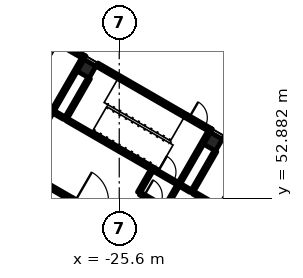
"""IFC4 building model, lengths in metres.
Left out: names, types, materials, properties, quantities, classifications, styles, units other than length and angle.
Written with IfcOpenShell. Run it as: python <this file> out.ifc"""

import sys

from ifc_helpers import new_model, si_unit, direction, frame, frame_2d, origin, origin_2d, place, context, subcontext, project, spatial, rectangle, extrude, element, fill, save


model = new_model("IFC4")
c1 = context("Model", 3, precision=1e-05, world=origin(), true_north=direction((0.0, 1.0)))
c2 = subcontext(c1, "Body", "Model", "MODEL_VIEW")
j1 = project(units=[si_unit("LENGTHUNIT", "METRE"), si_unit("PLANEANGLEUNIT", "RADIAN")], contexts=[c1])
p1 = place(None, origin())
s1 = spatial("IfcSite", under=j1, at=p1, CompositionType="ELEMENT")
p2 = place(p1, origin())
s2 = spatial("IfcBuilding", under=s1, at=p2, CompositionType="ELEMENT")
p3 = place(p2, origin())
s3 = spatial("IfcBuildingStorey", under=s2, at=p3, CompositionType="ELEMENT", Elevation=0.0)
for number, where, z_axis, x_axis in (
    (1, (-19.432, 56.599, -0.3), (0.0, 0.0, 1.0), (-0.5, -0.866, 0.0)),
    (2, (-27.746, 61.399, -0.3), (0.0, 0.0, 1.0), (-0.5, -0.866, 0.0)),
):
    element("IfcColumn", number, at=place(p3, frame(where, z_axis=z_axis, x_axis=x_axis)), inside=s3, PredefinedType="COLUMN", context=c2, shape_type="SweptSolid", body=[
        extrude(rectangle(XDim=0.9, YDim=0.9, at=origin_2d()), origin(), (0.0, 0.0, 1.0), 6.3),
    ])
p4 = place(p3, frame((-18.755, 56.872, 0.0), z_axis=(0.0, 0.0, 1.0), x_axis=(0.866026575979, -0.499997969693, 0.0)))
e3 = element("IfcWall", 3, at=p4, inside=s3, PredefinedType="SOLIDWALL", context=c2, shape_type="SweptSolid", body=[
    extrude(rectangle(XDim=6.75, YDim=0.25, at=frame_2d((3.375, 0.0))), origin(), (0.0, 0.0, 1.0), 5.7),
])
p5 = place(p3, frame((-21.223, 58.297, 0.0), z_axis=(0.0, 0.0, 1.0), x_axis=(0.866000971088, -0.500042316284, 0.0)))
e4 = element("IfcWall", 4, at=p5, inside=s3, PredefinedType="SOLIDWALL", context=c2, shape_type="SweptSolid", body=[
    extrude(rectangle(XDim=1.85, YDim=0.25, at=frame_2d((0.925, 0.0))), origin(), (0.0, 0.0, 1.0), 5.7),
])
p6 = place(p5, frame((0.25, 0.0, 0.0)))
e5 = element("IfcOpeningElement", 5, at=p6, cuts=e4, PredefinedType="OPENING", context=c2, shape_type="SweptSolid", body=[
    extrude(rectangle(XDim=1.2, YDim=2.1, at=frame_2d((0.6, 1.05))), frame((0.0, 0.135, 0.0), z_axis=(0.0, -1.0, 0.0), x_axis=(1.0, 0.0, 0.0)), (0.0, 0.0, 1.0), 0.27),
])
p7 = place(p3, frame((-27.069, 61.672, 0.0), z_axis=(0.0, 0.0, 1.0), x_axis=(0.866026575979, -0.499997969693, 0.0)))
e6 = element("IfcWall", 6, at=p7, inside=s3, PredefinedType="SOLIDWALL", context=c2, shape_type="SweptSolid", body=[
    extrude(rectangle(XDim=6.75, YDim=0.25, at=frame_2d((3.375, 0.0))), origin(), (0.0, 0.0, 1.0), 5.7),
])
p8 = place(p3, frame((-29.537, 63.097, 0.0), z_axis=(0.0, 0.0, 1.0), x_axis=(0.866033964044, -0.499985172903, 0.0)))
e7 = element("IfcWall", 7, at=p8, inside=s3, PredefinedType="SOLIDWALL", context=c2, shape_type="SweptSolid", body=[
    extrude(rectangle(XDim=1.85, YDim=0.25, at=frame_2d((0.925, 0.0))), origin(), (0.0, 0.0, 1.0), 5.7),
])
p9 = place(p8, frame((0.25, 0.0, 0.0)))
e8 = element("IfcOpeningElement", 8, at=p9, cuts=e7, PredefinedType="OPENING", context=c2, shape_type="SweptSolid", body=[
    extrude(rectangle(XDim=1.2, YDim=2.1, at=frame_2d((0.6, 1.05))), frame((0.0, 0.135, 0.0), z_axis=(0.0, -1.0, 0.0), x_axis=(1.0, 0.0, 0.0)), (0.0, 0.0, 1.0), 0.27),
])
p10 = place(p3, frame((-19.621, 57.372, 0.0), z_axis=(0.0, 0.0, 1.0), x_axis=(0.867038199201, -0.4982416694, 0.0)))
e9 = element("IfcWall", 9, at=p10, inside=s3, PredefinedType="SOLIDWALL", context=c2, shape_type="SweptSolid", body=[
    extrude(rectangle(XDim=0.1, YDim=0.25, at=frame_2d((0.05, 0.0))), origin(), (0.0, 0.0, 1.0), 5.7),
])
p11 = place(p3, frame((-27.935, 62.172, 0.0), z_axis=(0.0, 0.0, 1.0), x_axis=(0.865982457891, -0.500074377092, 0.0)))
e10 = element("IfcWall", 10, at=p11, inside=s3, PredefinedType="SOLIDWALL", context=c2, shape_type="SweptSolid", body=[
    extrude(rectangle(XDim=0.1, YDim=0.25, at=frame_2d((0.05, 0.0))), origin(), (0.0, 0.0, 1.0), 5.7),
])
p12 = place(p3, frame((-19.267, 55.984, 0.0), z_axis=(0.0, 0.0, 1.0), x_axis=(-0.49999285859, -0.86602952684, 0.0)))
e11 = element("IfcWall", 11, at=p12, inside=s3, PredefinedType="SOLIDWALL", context=c2, shape_type="SweptSolid", body=[
    extrude(rectangle(XDim=3.1, YDim=0.2, at=frame_2d((1.55, 0.0))), origin(), (0.0, 0.0, 1.0), 5.7),
])
p13 = place(p3, frame((-19.683, 57.263, 0.0), z_axis=(0.0, 0.0, 1.0), x_axis=(-0.49999894854, -0.866026010844, 0.0)))
e12 = element("IfcWall", 12, at=p13, inside=s3, PredefinedType="SOLIDWALL", context=c2, shape_type="SweptSolid", body=[
    extrude(rectangle(XDim=4.0, YDim=0.2, at=frame_2d((2.0, 0.0))), origin(), (0.0, 0.0, 1.0), 5.7),
])
p14 = place(p3, frame((-27.581, 60.784, 0.0), z_axis=(0.0, 0.0, 1.0), x_axis=(-0.49999285859, -0.86602952684, 0.0)))
e13 = element("IfcWall", 13, at=p14, inside=s3, PredefinedType="SOLIDWALL", context=c2, shape_type="SweptSolid", body=[
    extrude(rectangle(XDim=3.1, YDim=0.2, at=frame_2d((1.55, 0.0))), origin(), (0.0, 0.0, 1.0), 5.7),
])
p15 = place(p3, frame((-27.997, 62.063, 0.0), z_axis=(0.0, 0.0, 1.0), x_axis=(-0.49999894854, -0.866026010844, 0.0)))
e14 = element("IfcWall", 14, at=p15, inside=s3, PredefinedType="SOLIDWALL", context=c2, shape_type="SweptSolid", body=[
    extrude(rectangle(XDim=4.0, YDim=0.2, at=frame_2d((2.0, 0.0))), origin(), (0.0, 0.0, 1.0), 5.7),
])
p16 = place(p3, frame((-14.972, 49.924, 0.0), z_axis=(0.0, 0.0, 1.0), x_axis=(-0.86601134256, 0.500024353964, 0.0)))
e15 = element("IfcWall", 15, at=p16, inside=s3, PredefinedType="SOLIDWALL", context=c2, shape_type="SweptSolid", body=[
    extrude(rectangle(XDim=6.65, YDim=0.2, at=frame_2d((3.325, 0.0))), origin(), (0.0, 0.0, 1.0), 5.7),
])
p17 = place(p3, frame((-23.285, 54.724, 0.0), z_axis=(0.0, 0.0, 1.0), x_axis=(0.866002029911, -0.500040482552, 0.0)))
e16 = element("IfcWall", 16, at=p17, inside=s3, PredefinedType="SOLIDWALL", context=c2, shape_type="SweptSolid", body=[
    extrude(rectangle(XDim=1.75, YDim=0.2, at=frame_2d((0.875, 0.0))), origin(), (0.0, 0.0, 1.0), 5.7),
])
p18 = place(p17, frame((0.25, 0.0, 0.0)))
e17 = element("IfcOpeningElement", 17, at=p18, cuts=e16, PredefinedType="OPENING", context=c2, shape_type="SweptSolid", body=[
    extrude(rectangle(XDim=1.2, YDim=2.1, at=frame_2d((0.6, 1.05))), frame((0.0, 0.11, 0.0), z_axis=(0.0, -1.0, 0.0), x_axis=(1.0, 0.0, 0.0)), (0.0, 0.0, 1.0), 0.22),
])
p19 = place(p3, frame((-23.285, 54.724, 0.0), z_axis=(0.0, 0.0, 1.0), x_axis=(-0.866027239912, 0.49999681972, 0.0)))
e18 = element("IfcWall", 18, at=p19, inside=s3, PredefinedType="SOLIDWALL", context=c2, shape_type="SweptSolid", body=[
    extrude(rectangle(XDim=6.65, YDim=0.2, at=frame_2d((3.325, 0.0))), origin(), (0.0, 0.0, 1.0), 5.7),
])
p20 = place(p3, frame((-21.733, 53.713, 0.0), z_axis=(0.0, 0.0, 1.0), x_axis=(-0.499892348375, -0.866087547558, 0.0)))
e19 = element("IfcWall", 19, at=p20, inside=s3, PredefinedType="PARTITIONING", context=c2, shape_type="SweptSolid", body=[
    extrude(rectangle(XDim=1.7, YDim=0.2, at=frame_2d((0.85, 0.0))), origin(), (0.0, 0.0, 1.0), 5.1),
])
p21 = place(p3, frame((-23.465, 54.713, 0.0), z_axis=(0.0, 0.0, 1.0), x_axis=(-0.500000056704, -0.866025371046, 0.0)))
e20 = element("IfcWall", 20, at=p21, inside=s3, PredefinedType="PARTITIONING", context=c2, shape_type="SweptSolid", body=[
    extrude(rectangle(XDim=1.7, YDim=0.2, at=frame_2d((0.85, 0.0))), origin(), (0.0, 0.0, 1.0), 5.1),
])
p22 = place(p3, frame((-30.047, 58.513, 0.0), z_axis=(0.0, 0.0, 1.0), x_axis=(-0.500062241894, -0.865989465428, 0.0)))
e21 = element("IfcWall", 21, at=p22, inside=s3, PredefinedType="PARTITIONING", context=c2, shape_type="SweptSolid", body=[
    extrude(rectangle(XDim=1.7, YDim=0.2, at=frame_2d((0.85, 0.0))), origin(), (0.0, 0.0, 1.0), 5.1),
])
p23 = place(p3, frame((-24.229, 53.19, 0.0), z_axis=(0.0, 0.0, 1.0), x_axis=(0.866047807691, -0.499961193289, 0.0)))
e22 = element("IfcWall", 22, at=p23, inside=s3, PredefinedType="PARTITIONING", context=c2, shape_type="SweptSolid", body=[
    extrude(rectangle(XDim=1.8, YDim=0.2, at=frame_2d((0.9, 0.0))), origin(), (0.0, 0.0, 1.0), 5.1),
])
p24 = place(p23, frame((0.3, 0.0, 0.0)))
e23 = element("IfcOpeningElement", 23, at=p24, cuts=e22, PredefinedType="OPENING", context=c2, shape_type="SweptSolid", body=[
    extrude(rectangle(XDim=1.2, YDim=2.1, at=frame_2d((0.6, 1.05))), frame((0.0, 0.11, 0.0), z_axis=(0.0, -1.0, 0.0), x_axis=(1.0, 0.0, 0.0)), (0.0, 0.0, 1.0), 0.22),
])
p25 = place(p3, frame((-28.72, 52.811, 0.0), z_axis=(0.0, 0.0, 1.0), x_axis=(-0.866028853923, 0.499994024137, 0.0)))
e24 = element("IfcWall", 24, at=p25, inside=s3, PredefinedType="SOLIDWALL", context=c2, shape_type="SweptSolid", body=[
    extrude(rectangle(XDim=6.9, YDim=0.25, at=frame_2d((3.45, 0.0))), origin(), (0.0, 0.0, 1.0), 5.1),
])
p26 = place(p3, frame((-20.904, 53.349, 0.0), z_axis=(0.0, 0.0, 1.0), x_axis=(-0.865961984968, 0.500109828528, 0.0)))
e25 = element("IfcWall", 25, at=p26, inside=s3, PredefinedType="PARTITIONING", context=c2, shape_type="SweptSolid", body=[
    extrude(rectangle(XDim=0.8, YDim=0.2, at=frame_2d((0.4, 0.0))), origin(), (0.0, 0.0, 1.0), 5.1),
])
p27 = place(p3, frame((-29.218, 58.149, 0.0), z_axis=(0.0, 0.0, 1.0), x_axis=(-0.866017831539, 0.500013115284, 0.0)))
e26 = element("IfcWall", 26, at=p27, inside=s3, PredefinedType="PARTITIONING", context=c2, shape_type="SweptSolid", body=[
    extrude(rectangle(XDim=0.8, YDim=0.2, at=frame_2d((0.4, 0.0))), origin(), (0.0, 0.0, 1.0), 5.1),
])
p28 = place(p6, origin())
e27 = element("IfcDoor", 27, at=p28, inside=s3, OperationType="SINGLE_SWING_LEFT", PredefinedType="DOOR", context=c2, shape_type="SweptSolid", body=[
    extrude(rectangle(XDim=1.2, YDim=2.1, at=frame_2d((0.6, 1.05))), frame((0.0, 0.025, 0.0), z_axis=(0.0, -1.0, 0.0), x_axis=(1.0, 0.0, 0.0)), (0.0, 0.0, 1.0), 0.05),
])
fill(e5, e27)
p29 = place(p9, origin())
e28 = element("IfcDoor", 28, at=p29, inside=s3, OperationType="SINGLE_SWING_LEFT", PredefinedType="DOOR", context=c2, shape_type="SweptSolid", body=[
    extrude(rectangle(XDim=1.2, YDim=2.1, at=frame_2d((0.6, 1.05))), frame((0.0, 0.025, 0.0), z_axis=(0.0, -1.0, 0.0), x_axis=(1.0, 0.0, 0.0)), (0.0, 0.0, 1.0), 0.05),
])
fill(e8, e28)
p30 = place(p18, origin())
e29 = element("IfcDoor", 29, at=p30, inside=s3, OperationType="SINGLE_SWING_LEFT", PredefinedType="DOOR", context=c2, shape_type="SweptSolid", body=[
    extrude(rectangle(XDim=1.2, YDim=2.1, at=frame_2d((0.6, 1.05))), frame((0.0, 0.025, 0.0), z_axis=(0.0, -1.0, 0.0), x_axis=(1.0, 0.0, 0.0)), (0.0, 0.0, 1.0), 0.05),
])
fill(e17, e29)
p31 = place(p24, origin())
e30 = element("IfcDoor", 30, at=p31, inside=s3, OperationType="SINGLE_SWING_LEFT", PredefinedType="DOOR", context=c2, shape_type="SweptSolid", body=[
    extrude(rectangle(XDim=1.2, YDim=2.1, at=frame_2d((0.6, 1.05))), frame((0.0, 0.025, 0.0), z_axis=(0.0, -1.0, 0.0), x_axis=(1.0, 0.0, 0.0)), (0.0, 0.0, 1.0), 0.05),
])
fill(e23, e30)
save(model, sys.argv[1])
